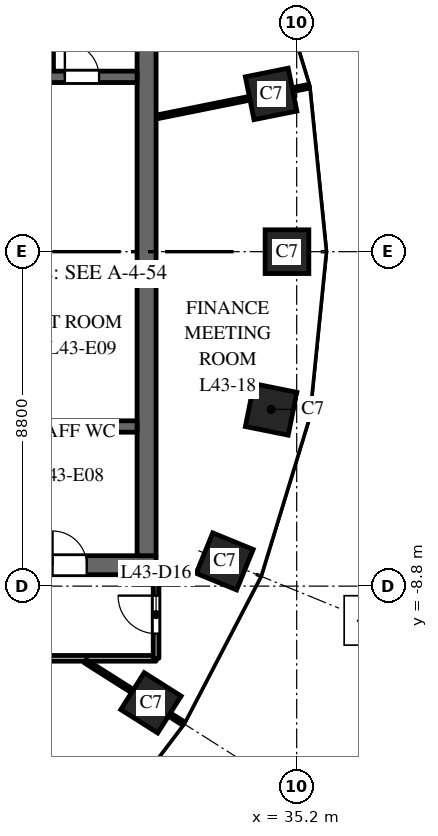
"""IFC4 building model, lengths in metres.
Left out: names, types, materials, properties, quantities, classifications, styles, units other than length and angle.
Written with IfcOpenShell. Run it as: python <this file> out.ifc"""

import sys

from ifc_helpers import new_model, si_unit, direction, frame, frame_2d, origin, origin_2d, place, context, subcontext, project, spatial, rectangle, extrude, element, fill, save


model = new_model("IFC4")
c1 = context("Model", 3, precision=1e-05, world=origin(), true_north=direction((0.0, 1.0)))
c2 = subcontext(c1, "Body", "Model", "MODEL_VIEW")
j1 = project(units=[si_unit("LENGTHUNIT", "METRE"), si_unit("PLANEANGLEUNIT", "RADIAN")], contexts=[c1])
p1 = place(None, origin())
s1 = spatial("IfcSite", under=j1, at=p1, CompositionType="ELEMENT")
p2 = place(p1, origin())
s2 = spatial("IfcBuilding", under=s1, at=p2, CompositionType="ELEMENT")
p3 = place(p2, frame((0.0, 0.0, 186.0)))
s3 = spatial("IfcBuildingStorey", under=s2, at=p3, CompositionType="ELEMENT", Elevation=186.0)
for number, where, z_axis, x_axis in (
    (1, (34.945, 0.0, 0.0), (0.0, 0.0, 1.0), (0.0, 1.0, 0.0)),
    (2, (34.527, 4.151, 0.0), (0.0, 0.0, 1.0), (-0.197, 0.98, 0.0)),
    (3, (31.365, -11.871, 0.0), (0.0, 0.0, 1.0), (0.535, 0.845, 0.0)),
    (4, (33.305, -8.149, 0.0), (0.0, 0.0, 1.0), (0.379, 0.925, 0.0)),
    (5, (34.527, -4.151, 0.0), (0.0, 0.0, 1.0), (0.197, 0.98, 0.0)),
):
    element("IfcColumn", number, at=place(p3, frame(where, z_axis=z_axis, x_axis=x_axis)), inside=s3, PredefinedType="COLUMN", context=c2, shape_type="SweptSolid", body=[
        extrude(rectangle(XDim=1.15, YDim=1.15, at=origin_2d()), origin(), (0.0, 0.0, 1.0), 4.0),
    ])
p4 = place(p3, frame((16.5, -8.25, 0.0), z_axis=(0.0, 0.0, 1.0), x_axis=(1.0, 0.0, 0.0)))
e6 = element("IfcWall", 6, at=p4, inside=s3, PredefinedType="SHEAR", context=c2, shape_type="SweptSolid", body=[
    extrude(rectangle(XDim=15.0, YDim=0.5, at=frame_2d((7.5, 0.0))), origin(), (0.0, 0.0, 1.0), 3.7),
])
p5 = place(p4, frame((6.9, 0.0, 0.0)))
e7 = element("IfcOpeningElement", 7, at=p5, cuts=e6, PredefinedType="OPENING", context=c2, shape_type="SweptSolid", body=[
    extrude(rectangle(XDim=1.2, YDim=2.1, at=frame_2d((0.6, 1.05))), frame((0.0, 0.26, 0.0), z_axis=(0.0, -1.0, 0.0), x_axis=(1.0, 0.0, 0.0)), (0.0, 0.0, 1.0), 0.52),
])
p6 = place(p4, frame((12.275, 0.0, 0.0)))
e8 = element("IfcOpeningElement", 8, at=p6, cuts=e6, PredefinedType="OPENING", context=c2, shape_type="SweptSolid", body=[
    extrude(rectangle(XDim=0.9, YDim=2.1, at=frame_2d((0.45, 1.05))), frame((0.0, 0.26, 0.0), z_axis=(0.0, -1.0, 0.0), x_axis=(1.0, 0.0, 0.0)), (0.0, 0.0, 1.0), 0.52),
])
p7 = place(p3, frame((31.25, -8.0, 0.0), z_axis=(0.0, 0.0, 1.0), x_axis=(0.0, 1.0, 0.0)))
e9 = element("IfcWall", 9, at=p7, inside=s3, PredefinedType="SHEAR", context=c2, shape_type="SweptSolid", body=[
    extrude(rectangle(XDim=16.0, YDim=0.5, at=frame_2d((8.0, 0.0))), origin(), (0.0, 0.0, 1.0), 3.7),
])
p8 = place(p3, frame((24.9, 4.6, 0.0), z_axis=(0.0, 0.0, 1.0), x_axis=(1.0, 0.0, 0.0)))
e10 = element("IfcWall", 10, at=p8, inside=s3, PredefinedType="SHEAR", context=c2, shape_type="SweptSolid", body=[
    extrude(rectangle(XDim=6.1, YDim=0.3, at=frame_2d((3.05, 0.0))), origin(), (0.0, 0.0, 1.0), 3.7),
])
p9 = place(p8, frame((4.2, 0.0, 0.0)))
e11 = element("IfcOpeningElement", 11, at=p9, cuts=e10, PredefinedType="OPENING", context=c2, shape_type="SweptSolid", body=[
    extrude(rectangle(XDim=0.9, YDim=2.1, at=frame_2d((0.45, 1.05))), frame((0.0, 0.16, 0.0), z_axis=(0.0, -1.0, 0.0), x_axis=(1.0, 0.0, 0.0)), (0.0, 0.0, 1.0), 0.32),
])
p10 = place(p3, frame((28.7, 4.75, 0.0), z_axis=(0.0, 0.0, 1.0), x_axis=(0.0, 1.0, 0.0)))
e12 = element("IfcWall", 12, at=p10, inside=s3, PredefinedType="PARTITIONING", context=c2, shape_type="SweptSolid", body=[
    extrude(rectangle(XDim=3.25, YDim=0.2, at=frame_2d((1.625, 0.0))), origin(), (0.0, 0.0, 1.0), 3.7),
])
p11 = place(p3, frame((24.9, -4.6, 0.0), z_axis=(0.0, 0.0, 1.0), x_axis=(1.0, 0.0, 0.0)))
e13 = element("IfcWall", 13, at=p11, inside=s3, PredefinedType="SHEAR", context=c2, shape_type="SweptSolid", body=[
    extrude(rectangle(XDim=6.1, YDim=0.3, at=frame_2d((3.05, 0.0))), origin(), (0.0, 0.0, 1.0), 3.7),
])
p12 = place(p3, frame((16.5, -10.7, 0.0), z_axis=(0.0, 0.0, 1.0), x_axis=(1.0, 0.0, 0.0)))
e14 = element("IfcWall", 14, at=p12, inside=s3, PredefinedType="PARTITIONING", context=c2, shape_type="SweptSolid", body=[
    extrude(rectangle(XDim=15.0, YDim=0.15, at=frame_2d((7.5, 0.0))), origin(), (0.0, 0.0, 1.0), 2.75),
])
p13 = place(p12, frame((0.65, 0.0, 0.0)))
e15 = element("IfcOpeningElement", 15, at=p13, cuts=e14, PredefinedType="OPENING", context=c2, shape_type="SweptSolid", body=[
    extrude(rectangle(XDim=1.0, YDim=2.1, at=frame_2d((0.5, 1.05))), frame((0.0, 0.085, 0.0), z_axis=(0.0, -1.0, 0.0), x_axis=(1.0, 0.0, 0.0)), (0.0, 0.0, 1.0), 0.17),
])
p14 = place(p12, frame((7.061, 0.0, 0.0)))
e16 = element("IfcOpeningElement", 16, at=p14, cuts=e14, PredefinedType="OPENING", context=c2, shape_type="SweptSolid", body=[
    extrude(rectangle(XDim=1.0, YDim=2.1, at=frame_2d((0.5, 1.05))), frame((0.0, 0.085, 0.0), z_axis=(0.0, -1.0, 0.0), x_axis=(1.0, 0.0, 0.0)), (0.0, 0.0, 1.0), 0.17),
])
p15 = place(p3, frame((29.637, -10.777, 0.0), z_axis=(0.0, 0.0, 1.0), x_axis=(0.844810627195, -0.535065420467, 0.0)))
e17 = element("IfcWall", 17, at=p15, inside=s3, PredefinedType="PARTITIONING", context=c2, shape_type="SweptSolid", body=[
    extrude(rectangle(XDim=3.048, YDim=0.1, at=frame_2d((1.524, 0.0))), origin(), (0.0, 0.0, 1.0), 2.9),
])
p16 = place(p3, frame((31.5, -10.7, 0.0), z_axis=(0.0, 0.0, 1.0), x_axis=(0.0, 1.0, 0.0)))
e18 = element("IfcWall", 18, at=p16, inside=s3, PredefinedType="PARTITIONING", context=c2, shape_type="SweptSolid", body=[
    extrude(rectangle(XDim=2.2, YDim=0.15, at=frame_2d((1.1, 0.0))), origin(), (0.0, 0.0, 1.0), 2.9),
])
p17 = place(p16, frame((0.65, 0.0, 0.0)))
e19 = element("IfcOpeningElement", 19, at=p17, cuts=e18, PredefinedType="OPENING", context=c2, shape_type="SweptSolid", body=[
    extrude(rectangle(XDim=1.0, YDim=2.1, at=frame_2d((0.5, 1.05))), frame((0.0, 0.085, 0.0), z_axis=(0.0, -1.0, 0.0), x_axis=(1.0, 0.0, 0.0)), (0.0, 0.0, 1.0), 0.17),
])
p18 = place(p3, frame((31.5, 3.542, 0.0), z_axis=(0.0, 0.0, 1.0), x_axis=(0.980357474535, 0.197228857227, 0.0)))
e20 = element("IfcWall", 20, at=p18, inside=s3, PredefinedType="PARTITIONING", context=c2, shape_type="SweptSolid", body=[
    extrude(rectangle(XDim=4.092, YDim=0.1, at=frame_2d((2.046, 0.0))), origin(), (0.0, 0.0, 1.0), 2.9),
])
p19 = place(p6, origin())
e21 = element("IfcDoor", 21, at=p19, inside=s3, OperationType="SINGLE_SWING_RIGHT", PredefinedType="DOOR", context=c2, shape_type="SweptSolid", body=[
    extrude(rectangle(XDim=0.9, YDim=2.1, at=frame_2d((0.45, 1.05))), frame((0.0, 0.025, 0.0), z_axis=(0.0, -1.0, 0.0), x_axis=(1.0, 0.0, 0.0)), (0.0, 0.0, 1.0), 0.05),
])
fill(e8, e21)
p20 = place(p9, origin())
e22 = element("IfcDoor", 22, at=p20, inside=s3, OperationType="SINGLE_SWING_RIGHT", PredefinedType="DOOR", context=c2, shape_type="SweptSolid", body=[
    extrude(rectangle(XDim=0.9, YDim=2.1, at=frame_2d((0.45, 1.05))), frame((0.0, 0.025, 0.0), z_axis=(0.0, -1.0, 0.0), x_axis=(1.0, 0.0, 0.0)), (0.0, 0.0, 1.0), 0.05),
])
fill(e11, e22)
p21 = place(p17, origin())
e23 = element("IfcDoor", 23, at=p21, inside=s3, OperationType="SINGLE_SWING_RIGHT", PredefinedType="DOOR", context=c2, shape_type="SweptSolid", body=[
    extrude(rectangle(XDim=1.0, YDim=2.1, at=frame_2d((0.5, 1.05))), frame((0.0, 0.025, 0.0), z_axis=(0.0, -1.0, 0.0), x_axis=(1.0, 0.0, 0.0)), (0.0, 0.0, 1.0), 0.05),
])
fill(e19, e23)
save(model, sys.argv[1])
